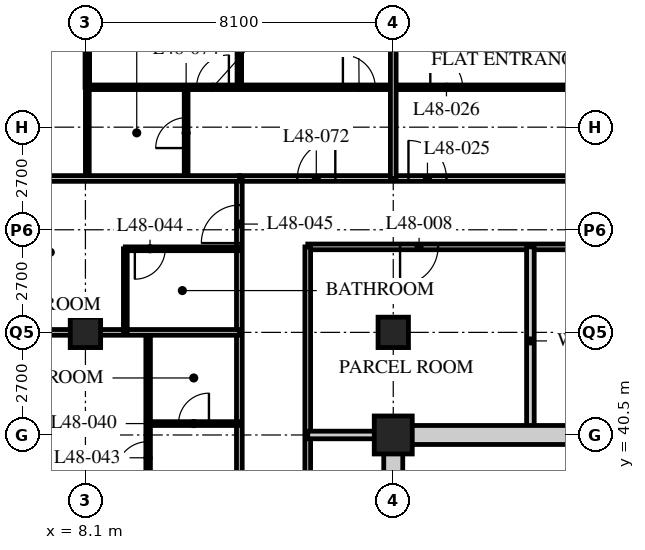
"""IFC4 building model, lengths in metres.
Left out: names, types, materials, properties, quantities, classifications, styles, units other than length and angle.
Written with IfcOpenShell. Run it as: python <this file> out.ifc"""

import sys

from ifc_helpers import new_model, si_unit, direction, frame, frame_2d, origin, origin_2d, place, context, subcontext, project, spatial, rectangle, hollow_rectangle, extrude, element, fill, save


model = new_model("IFC4")
c1 = context("Model", 3, precision=1e-05, world=origin(), true_north=direction((0.0, 1.0)))
c2 = subcontext(c1, "Body", "Model", "MODEL_VIEW")
j1 = project(units=[si_unit("LENGTHUNIT", "METRE"), si_unit("PLANEANGLEUNIT", "RADIAN")], contexts=[c1])
p1 = place(None, origin())
s1 = spatial("IfcSite", under=j1, at=p1, CompositionType="ELEMENT")
p2 = place(p1, origin())
s2 = spatial("IfcBuilding", under=s1, at=p2, CompositionType="ELEMENT")
p3 = place(p2, frame((0.0, 0.0, 188.4)))
s3 = spatial("IfcBuildingStorey", under=s2, at=p3, CompositionType="ELEMENT", Elevation=188.4)
p4 = place(p3, frame((8.1, 43.2, 0.0), z_axis=(0.0, 0.0, 1.0), x_axis=(1.0, 0.0, 0.0)))
e1 = element("IfcColumn", 1, at=p4, inside=s3, PredefinedType="COLUMN", context=c2, shape_type="SweptSolid", body=[
    extrude(hollow_rectangle(XDim=0.8, YDim=0.8, WallThickness=0.08, at=origin_2d()), origin(), (0.0, 0.0, 1.0), 3.6),
])
p5 = place(p3, frame((16.2, 40.5, 0.0), z_axis=(0.0, 0.0, 1.0), x_axis=(1.0, 0.0, 0.0)))
e2 = element("IfcColumn", 2, at=p5, inside=s3, PredefinedType="COLUMN", context=c2, shape_type="SweptSolid", body=[
    extrude(hollow_rectangle(XDim=1.0, YDim=1.0, WallThickness=0.1, at=origin_2d()), origin(), (0.0, 0.0, 1.0), 3.6),
])
p6 = place(p3, frame((16.2, 43.2, 0.0), z_axis=(0.0, 0.0, 1.0), x_axis=(1.0, 0.0, 0.0)))
e3 = element("IfcColumn", 3, at=p6, inside=s3, PredefinedType="COLUMN", context=c2, shape_type="SweptSolid", body=[
    extrude(hollow_rectangle(XDim=0.8, YDim=0.8, WallThickness=0.08, at=origin_2d()), origin(), (0.0, 0.0, 1.0), 3.6),
])
p7 = place(p3, frame((12.15, 47.25, 0.0), z_axis=(0.0, 0.0, 1.0), x_axis=(1.0, 0.0, 0.0)))
e4 = element("IfcWall", 4, at=p7, inside=s3, PredefinedType="PARTITIONING", context=c2, shape_type="SweptSolid", body=[
    extrude(rectangle(XDim=32.4, YDim=0.15, at=frame_2d((16.2, 0.0))), origin(), (0.0, 0.0, 1.0), 3.39),
])
p8 = place(p7, frame((4.45, 0.0, 0.0)))
e5 = element("IfcOpeningElement", 5, at=p8, cuts=e4, PredefinedType="OPENING", context=c2, shape_type="SweptSolid", body=[
    extrude(rectangle(XDim=1.0, YDim=2.1, at=frame_2d((0.5, 1.05))), frame((0.0, 0.085, 0.0), z_axis=(0.0, -1.0, 0.0), x_axis=(1.0, 0.0, 0.0)), (0.0, 0.0, 1.0), 0.17),
])
p9 = place(p7, frame((16.6, 0.0, 0.0)))
e6 = element("IfcOpeningElement", 6, at=p9, cuts=e4, PredefinedType="OPENING", context=c2, shape_type="SweptSolid", body=[
    extrude(rectangle(XDim=1.0, YDim=2.1, at=frame_2d((0.5, 1.05))), frame((0.0, 0.085, 0.0), z_axis=(0.0, -1.0, 0.0), x_axis=(1.0, 0.0, 0.0)), (0.0, 0.0, 1.0), 0.17),
])
p10 = place(p7, frame((29.875, 0.0, 0.0)))
e7 = element("IfcOpeningElement", 7, at=p10, cuts=e4, PredefinedType="OPENING", context=c2, shape_type="SweptSolid", body=[
    extrude(rectangle(XDim=1.0, YDim=2.1, at=frame_2d((0.5, 1.05))), frame((0.0, 0.085, 0.0), z_axis=(0.0, -1.0, 0.0), x_axis=(1.0, 0.0, 0.0)), (0.0, 0.0, 1.0), 0.17),
])
p11 = place(p7, frame((1.525, 0.0, 0.0)))
e8 = element("IfcOpeningElement", 8, at=p11, cuts=e4, PredefinedType="OPENING", context=c2, shape_type="SweptSolid", body=[
    extrude(rectangle(XDim=1.0, YDim=2.1, at=frame_2d((0.5, 1.05))), frame((0.0, 0.085, 0.0), z_axis=(0.0, -1.0, 0.0), x_axis=(1.0, 0.0, 0.0)), (0.0, 0.0, 1.0), 0.17),
])
p12 = place(p3, frame((12.15, 18.9, 0.0), z_axis=(0.0, 0.0, 1.0), x_axis=(0.0, 1.0, 0.0)))
e9 = element("IfcWall", 9, at=p12, inside=s3, PredefinedType="PARTITIONING", context=c2, shape_type="SweptSolid", body=[
    extrude(rectangle(XDim=28.35, YDim=0.15, at=frame_2d((14.175, 0.0))), origin(), (0.0, 0.0, 1.0), 3.39),
])
p13 = place(p12, frame((2.35, 0.0, 0.0)))
e10 = element("IfcOpeningElement", 10, at=p13, cuts=e9, PredefinedType="OPENING", context=c2, shape_type="SweptSolid", body=[
    extrude(rectangle(XDim=1.0, YDim=2.1, at=frame_2d((0.5, 1.05))), frame((0.0, 0.085, 0.0), z_axis=(0.0, -1.0, 0.0), x_axis=(1.0, 0.0, 0.0)), (0.0, 0.0, 1.0), 0.17),
])
p14 = place(p12, frame((6.4, 0.0, 0.0)))
e11 = element("IfcOpeningElement", 11, at=p14, cuts=e9, PredefinedType="OPENING", context=c2, shape_type="SweptSolid", body=[
    extrude(rectangle(XDim=1.0, YDim=2.1, at=frame_2d((0.5, 1.05))), frame((0.0, 0.085, 0.0), z_axis=(0.0, -1.0, 0.0), x_axis=(1.0, 0.0, 0.0)), (0.0, 0.0, 1.0), 0.17),
])
p15 = place(p12, frame((8.5, 0.0, 0.0)))
e12 = element("IfcOpeningElement", 12, at=p15, cuts=e9, PredefinedType="OPENING", context=c2, shape_type="SweptSolid", body=[
    extrude(rectangle(XDim=1.0, YDim=2.1, at=frame_2d((0.5, 1.05))), frame((0.0, 0.085, 0.0), z_axis=(0.0, -1.0, 0.0), x_axis=(1.0, 0.0, 0.0)), (0.0, 0.0, 1.0), 0.17),
])
p16 = place(p12, frame((16.6, 0.0, 0.0)))
e13 = element("IfcOpeningElement", 13, at=p16, cuts=e9, PredefinedType="OPENING", context=c2, shape_type="SweptSolid", body=[
    extrude(rectangle(XDim=1.0, YDim=2.1, at=frame_2d((0.5, 1.05))), frame((0.0, 0.085, 0.0), z_axis=(0.0, -1.0, 0.0), x_axis=(1.0, 0.0, 0.0)), (0.0, 0.0, 1.0), 0.17),
])
p17 = place(p12, frame((26.65, 0.0, 0.0)))
e14 = element("IfcOpeningElement", 14, at=p17, cuts=e9, PredefinedType="OPENING", context=c2, shape_type="SweptSolid", body=[
    extrude(rectangle(XDim=1.0, YDim=2.1, at=frame_2d((0.5, 1.05))), frame((0.0, 0.085, 0.0), z_axis=(0.0, -1.0, 0.0), x_axis=(1.0, 0.0, 0.0)), (0.0, 0.0, 1.0), 0.17),
])
p18 = place(p3, frame((27.14, 45.45, 0.0), z_axis=(0.0, 0.0, 1.0), x_axis=(-1.0, 0.0, 0.0)))
e15 = element("IfcWall", 15, at=p18, inside=s3, PredefinedType="PARTITIONING", context=c2, shape_type="SweptSolid", body=[
    extrude(rectangle(XDim=13.19, YDim=0.15, at=frame_2d((6.595, 0.0))), origin(), (0.0, 0.0, 1.0), 3.39),
])
p19 = place(p18, frame((9.761, 0.0, 0.0)))
e16 = element("IfcOpeningElement", 16, at=p19, cuts=e15, PredefinedType="OPENING", context=c2, shape_type="SweptSolid", body=[
    extrude(rectangle(XDim=1.0, YDim=2.1, at=frame_2d((0.5, 1.05))), frame((0.0, 0.085, 0.0), z_axis=(0.0, -1.0, 0.0), x_axis=(1.0, 0.0, 0.0)), (0.0, 0.0, 1.0), 0.17),
])
p20 = place(p18, frame((3.161, 0.0, 0.0)))
e17 = element("IfcOpeningElement", 17, at=p20, cuts=e15, PredefinedType="OPENING", context=c2, shape_type="SweptSolid", body=[
    extrude(rectangle(XDim=1.0, YDim=2.1, at=frame_2d((0.5, 1.05))), frame((0.0, 0.085, 0.0), z_axis=(0.0, -1.0, 0.0), x_axis=(1.0, 0.0, 0.0)), (0.0, 0.0, 1.0), 0.17),
])
p21 = place(p3, frame((13.95, 45.45, 0.0), z_axis=(0.0, 0.0, 1.0), x_axis=(0.0, -1.0, 0.0)))
e18 = element("IfcWall", 18, at=p21, inside=s3, PredefinedType="PARTITIONING", context=c2, shape_type="SweptSolid", body=[
    extrude(rectangle(XDim=24.75, YDim=0.15, at=frame_2d((12.375, 0.0))), origin(), (0.0, 0.0, 1.0), 3.39),
])
p22 = place(p21, frame((16.6, 0.0, 0.0)))
e19 = element("IfcOpeningElement", 19, at=p22, cuts=e18, PredefinedType="OPENING", context=c2, shape_type="SweptSolid", body=[
    extrude(rectangle(XDim=1.0, YDim=2.1, at=frame_2d((0.5, 1.05))), frame((0.0, 0.085, 0.0), z_axis=(0.0, -1.0, 0.0), x_axis=(1.0, 0.0, 0.0)), (0.0, 0.0, 1.0), 0.17),
])
p23 = place(p21, frame((8.5, 0.0, 0.0)))
e20 = element("IfcOpeningElement", 20, at=p23, cuts=e18, PredefinedType="OPENING", context=c2, shape_type="SweptSolid", body=[
    extrude(rectangle(XDim=1.0, YDim=2.1, at=frame_2d((0.5, 1.05))), frame((0.0, 0.085, 0.0), z_axis=(0.0, -1.0, 0.0), x_axis=(1.0, 0.0, 0.0)), (0.0, 0.0, 1.0), 0.17),
])
p24 = place(p3, frame((19.809, 45.45, 0.0), z_axis=(0.0, 0.0, 1.0), x_axis=(0.0, -1.0, 0.0)))
e21 = element("IfcWall", 21, at=p24, inside=s3, PredefinedType="SOLIDWALL", context=c2, shape_type="SweptSolid", body=[
    extrude(rectangle(XDim=4.95, YDim=0.2, at=frame_2d((2.475, 0.0))), origin(), (0.0, 0.0, 1.0), 3.39),
])
p25 = place(p3, frame((13.95, 40.5, 0.0), z_axis=(0.0, 0.0, 1.0), x_axis=(1.0, 0.0, 0.0)))
e22 = element("IfcWall", 22, at=p25, inside=s3, PredefinedType="SOLIDWALL", context=c2, shape_type="SweptSolid", body=[
    extrude(rectangle(XDim=2.25, YDim=0.2, at=frame_2d((1.125, 0.0))), origin(), (0.0, 0.0, 1.0), 3.39),
])
p26 = place(p3, frame((9.75, 27.0, 0.0), z_axis=(0.0, 0.0, 1.0), x_axis=(0.0, 1.0, 0.0)))
e23 = element("IfcWall", 23, at=p26, inside=s3, PredefinedType="PARTITIONING", context=c2, shape_type="SweptSolid", body=[
    extrude(rectangle(XDim=16.2, YDim=0.12, at=frame_2d((8.1, 0.0))), origin(), (0.0, 0.0, 1.0), 3.39),
])
p27 = place(p26, frame((0.975, 0.0, 0.0)))
e24 = element("IfcOpeningElement", 24, at=p27, cuts=e23, PredefinedType="OPENING", context=c2, shape_type="SweptSolid", body=[
    extrude(rectangle(XDim=0.85, YDim=2.1, at=frame_2d((0.425, 1.05))), frame((0.0, 0.07, 0.0), z_axis=(0.0, -1.0, 0.0), x_axis=(1.0, 0.0, 0.0)), (0.0, 0.0, 1.0), 0.14),
])
p28 = place(p26, frame((4.375, 0.0, 0.0)))
e25 = element("IfcOpeningElement", 25, at=p28, cuts=e23, PredefinedType="OPENING", context=c2, shape_type="SweptSolid", body=[
    extrude(rectangle(XDim=0.85, YDim=2.1, at=frame_2d((0.425, 1.05))), frame((0.0, 0.07, 0.0), z_axis=(0.0, -1.0, 0.0), x_axis=(1.0, 0.0, 0.0)), (0.0, 0.0, 1.0), 0.14),
])
p29 = place(p26, frame((9.075, 0.0, 0.0)))
e26 = element("IfcOpeningElement", 26, at=p29, cuts=e23, PredefinedType="OPENING", context=c2, shape_type="SweptSolid", body=[
    extrude(rectangle(XDim=0.85, YDim=2.1, at=frame_2d((0.425, 1.05))), frame((0.0, 0.07, 0.0), z_axis=(0.0, -1.0, 0.0), x_axis=(1.0, 0.0, 0.0)), (0.0, 0.0, 1.0), 0.14),
])
p30 = place(p26, frame((12.475, 0.0, 0.0)))
e27 = element("IfcOpeningElement", 27, at=p30, cuts=e23, PredefinedType="OPENING", context=c2, shape_type="SweptSolid", body=[
    extrude(rectangle(XDim=0.85, YDim=2.1, at=frame_2d((0.425, 1.05))), frame((0.0, 0.07, 0.0), z_axis=(0.0, -1.0, 0.0), x_axis=(1.0, 0.0, 0.0)), (0.0, 0.0, 1.0), 0.14),
])
p31 = place(p3, frame((12.15, 40.8, 0.0), z_axis=(0.0, 0.0, 1.0), x_axis=(-1.0, 0.0, 0.0)))
e28 = element("IfcWall", 28, at=p31, inside=s3, PredefinedType="PARTITIONING", context=c2, shape_type="SweptSolid", body=[
    extrude(rectangle(XDim=2.4, YDim=0.1, at=frame_2d((1.2, 0.0))), origin(), (0.0, 0.0, 1.0), 3.39),
])
p32 = place(p31, frame((0.8, 0.0, 0.0)))
e29 = element("IfcOpeningElement", 29, at=p32, cuts=e28, PredefinedType="OPENING", context=c2, shape_type="SweptSolid", body=[
    extrude(rectangle(XDim=0.8, YDim=2.1, at=frame_2d((0.4, 1.05))), frame((0.0, 0.06, 0.0), z_axis=(0.0, -1.0, 0.0), x_axis=(1.0, 0.0, 0.0)), (0.0, 0.0, 1.0), 0.12),
])
p33 = place(p3, frame((12.15, 43.2, 0.0), z_axis=(0.0, 0.0, 1.0), x_axis=(-1.0, 0.0, 0.0)))
e30 = element("IfcWall", 30, at=p33, inside=s3, PredefinedType="PARTITIONING", context=c2, shape_type="SweptSolid", body=[
    extrude(rectangle(XDim=11.85, YDim=0.15, at=frame_2d((5.925, 0.0))), origin(), (0.0, 0.0, 1.0), 2.778),
])
p34 = place(p3, frame((9.15, 43.2, 0.0), z_axis=(0.0, 0.0, 1.0), x_axis=(0.0, 1.0, 0.0)))
e31 = element("IfcWall", 31, at=p34, inside=s3, PredefinedType="PARTITIONING", context=c2, shape_type="SweptSolid", body=[
    extrude(rectangle(XDim=2.2, YDim=0.1, at=frame_2d((1.1, 0.0))), origin(), (0.0, 0.0, 1.0), 3.39),
])
p35 = place(p3, frame((12.15, 45.4, 0.0), z_axis=(0.0, 0.0, 1.0), x_axis=(-1.0, 0.0, 0.0)))
e32 = element("IfcWall", 32, at=p35, inside=s3, PredefinedType="PARTITIONING", context=c2, shape_type="SweptSolid", body=[
    extrude(rectangle(XDim=3.0, YDim=0.1, at=frame_2d((1.5, 0.0))), origin(), (0.0, 0.0, 1.0), 3.39),
])
p36 = place(p35, frame((1.95, 0.0, 0.0)))
e33 = element("IfcOpeningElement", 33, at=p36, cuts=e32, PredefinedType="OPENING", context=c2, shape_type="SweptSolid", body=[
    extrude(rectangle(XDim=0.8, YDim=2.1, at=frame_2d((0.4, 1.05))), frame((0.0, 0.06, 0.0), z_axis=(0.0, -1.0, 0.0), x_axis=(1.0, 0.0, 0.0)), (0.0, 0.0, 1.0), 0.12),
])
p37 = place(p3, frame((10.75, 47.25, 0.0), z_axis=(0.0, 0.0, 1.0), x_axis=(0.0, 1.0, 0.0)))
e34 = element("IfcWall", 34, at=p37, inside=s3, PredefinedType="PARTITIONING", context=c2, shape_type="SweptSolid", body=[
    extrude(rectangle(XDim=2.4, YDim=0.1, at=frame_2d((1.2, 0.0))), origin(), (0.0, 0.0, 1.0), 3.39),
])
p38 = place(p37, frame((0.8, 0.0, 0.0)))
e35 = element("IfcOpeningElement", 35, at=p38, cuts=e34, PredefinedType="OPENING", context=c2, shape_type="SweptSolid", body=[
    extrude(rectangle(XDim=0.8, YDim=2.1, at=frame_2d((0.4, 1.05))), frame((0.0, 0.06, 0.0), z_axis=(0.0, -1.0, 0.0), x_axis=(1.0, 0.0, 0.0)), (0.0, 0.0, 1.0), 0.12),
])
p39 = place(p3, frame((8.15, 47.25, 0.0), z_axis=(0.0, 0.0, 1.0), x_axis=(0.0, 1.0, 0.0)))
e36 = element("IfcWall", 36, at=p39, inside=s3, PredefinedType="PARTITIONING", context=c2, shape_type="SweptSolid", body=[
    extrude(rectangle(XDim=2.4, YDim=0.1, at=frame_2d((1.2, 0.0))), origin(), (0.0, 0.0, 1.0), 2.778),
])
p40 = place(p3, frame((8.15, 49.65, 0.0), z_axis=(0.0, 0.0, 1.0), x_axis=(1.0, 0.0, 0.0)))
e37 = element("IfcWall", 37, at=p40, inside=s3, PredefinedType="PARTITIONING", context=c2, shape_type="SweptSolid", body=[
    extrude(rectangle(XDim=40.4, YDim=0.12, at=frame_2d((20.2, 0.0))), origin(), (0.0, 0.0, 1.0), 3.39),
])
p41 = place(p40, frame((9.025, 0.0, 0.0)))
e38 = element("IfcOpeningElement", 38, at=p41, cuts=e37, PredefinedType="OPENING", context=c2, shape_type="SweptSolid", body=[
    extrude(rectangle(XDim=0.85, YDim=2.1, at=frame_2d((0.425, 1.05))), frame((0.0, 0.07, 0.0), z_axis=(0.0, -1.0, 0.0), x_axis=(1.0, 0.0, 0.0)), (0.0, 0.0, 1.0), 0.14),
])
p42 = place(p40, frame((16.475, 0.0, 0.0)))
e39 = element("IfcOpeningElement", 39, at=p42, cuts=e37, PredefinedType="OPENING", context=c2, shape_type="SweptSolid", body=[
    extrude(rectangle(XDim=0.85, YDim=2.1, at=frame_2d((0.425, 1.05))), frame((0.0, 0.07, 0.0), z_axis=(0.0, -1.0, 0.0), x_axis=(1.0, 0.0, 0.0)), (0.0, 0.0, 1.0), 0.14),
])
p43 = place(p40, frame((21.175, 0.0, 0.0)))
e40 = element("IfcOpeningElement", 40, at=p43, cuts=e37, PredefinedType="OPENING", context=c2, shape_type="SweptSolid", body=[
    extrude(rectangle(XDim=0.85, YDim=2.1, at=frame_2d((0.425, 1.05))), frame((0.0, 0.07, 0.0), z_axis=(0.0, -1.0, 0.0), x_axis=(1.0, 0.0, 0.0)), (0.0, 0.0, 1.0), 0.14),
])
p44 = place(p40, frame((28.625, 0.0, 0.0)))
e41 = element("IfcOpeningElement", 41, at=p44, cuts=e37, PredefinedType="OPENING", context=c2, shape_type="SweptSolid", body=[
    extrude(rectangle(XDim=0.85, YDim=2.1, at=frame_2d((0.425, 1.05))), frame((0.0, 0.07, 0.0), z_axis=(0.0, -1.0, 0.0), x_axis=(1.0, 0.0, 0.0)), (0.0, 0.0, 1.0), 0.14),
])
p45 = place(p40, frame((32.825, 0.0, 0.0)))
e42 = element("IfcOpeningElement", 42, at=p45, cuts=e37, PredefinedType="OPENING", context=c2, shape_type="SweptSolid", body=[
    extrude(rectangle(XDim=0.85, YDim=2.1, at=frame_2d((0.425, 1.05))), frame((0.0, 0.07, 0.0), z_axis=(0.0, -1.0, 0.0), x_axis=(1.0, 0.0, 0.0)), (0.0, 0.0, 1.0), 0.14),
])
p46 = place(p40, frame((36.675, 0.0, 0.0)))
e43 = element("IfcOpeningElement", 43, at=p46, cuts=e37, PredefinedType="OPENING", context=c2, shape_type="SweptSolid", body=[
    extrude(rectangle(XDim=0.85, YDim=2.1, at=frame_2d((0.425, 1.05))), frame((0.0, 0.07, 0.0), z_axis=(0.0, -1.0, 0.0), x_axis=(1.0, 0.0, 0.0)), (0.0, 0.0, 1.0), 0.14),
])
p47 = place(p40, frame((6.725, 0.0, 0.0)))
e44 = element("IfcOpeningElement", 44, at=p47, cuts=e37, PredefinedType="OPENING", context=c2, shape_type="SweptSolid", body=[
    extrude(rectangle(XDim=0.85, YDim=2.1, at=frame_2d((0.425, 1.05))), frame((0.0, 0.07, 0.0), z_axis=(0.0, -1.0, 0.0), x_axis=(1.0, 0.0, 0.0)), (0.0, 0.0, 1.0), 0.14),
])
p48 = place(p40, frame((2.875, 0.0, 0.0)))
e45 = element("IfcOpeningElement", 45, at=p48, cuts=e37, PredefinedType="OPENING", context=c2, shape_type="SweptSolid", body=[
    extrude(rectangle(XDim=0.85, YDim=2.1, at=frame_2d((0.425, 1.05))), frame((0.0, 0.07, 0.0), z_axis=(0.0, -1.0, 0.0), x_axis=(1.0, 0.0, 0.0)), (0.0, 0.0, 1.0), 0.14),
])
p49 = place(p3, frame((12.15, 49.65, 0.0), z_axis=(0.0, 0.0, 1.0), x_axis=(0.0, 1.0, 0.0)))
e46 = element("IfcWall", 46, at=p49, inside=s3, PredefinedType="PARTITIONING", context=c2, shape_type="SweptSolid", body=[
    extrude(rectangle(XDim=9.45, YDim=0.12, at=frame_2d((4.725, 0.0))), origin(), (0.0, 0.0, 1.0), 3.39),
])
p50 = place(p3, frame((0.3, 47.25, 0.0), z_axis=(0.0, 0.0, 1.0), x_axis=(1.0, 0.0, 0.0)))
e47 = element("IfcWall", 47, at=p50, inside=s3, PredefinedType="PARTITIONING", context=c2, shape_type="SweptSolid", body=[
    extrude(rectangle(XDim=11.85, YDim=0.15, at=frame_2d((5.925, 0.0))), origin(), (0.0, 0.0, 1.0), 3.39),
])
p51 = place(p3, frame((16.2, 47.25, 0.0), z_axis=(0.0, 0.0, 1.0), x_axis=(0.0, 1.0, 0.0)))
e48 = element("IfcWall", 48, at=p51, inside=s3, PredefinedType="PARTITIONING", context=c2, shape_type="SweptSolid", body=[
    extrude(rectangle(XDim=11.85, YDim=0.15, at=frame_2d((5.925, 0.0))), origin(), (0.0, 0.0, 1.0), 2.778),
])
p52 = place(p3, frame((8.15, 49.65, 0.0), z_axis=(0.0, 0.0, 1.0), x_axis=(0.0, 1.0, 0.0)))
e49 = element("IfcWall", 49, at=p52, inside=s3, PredefinedType="PARTITIONING", context=c2, shape_type="SweptSolid", body=[
    extrude(rectangle(XDim=1.25, YDim=0.12, at=frame_2d((0.625, 0.0))), origin(), (0.0, 0.0, 1.0), 2.778),
])
p53 = place(p3, frame((15.95, 40.5, 0.0), z_axis=(0.0, 0.0, 1.0), x_axis=(1.0, 0.0, 0.0)))
e50 = element("IfcWall", 50, at=p53, inside=s3, PredefinedType="SOLIDWALL", context=c2, shape_type="SweptSolid", body=[
    extrude(rectangle(XDim=24.8, YDim=0.5, at=frame_2d((12.4, 0.0))), origin(), (0.0, 0.0, 1.0), 2.74),
])
p54 = place(p53, frame((11.5, 0.0, 0.0)))
e51 = element("IfcOpeningElement", 51, at=p54, cuts=e50, PredefinedType="OPENING", context=c2, shape_type="SweptSolid", body=[
    extrude(rectangle(XDim=1.8, YDim=2.4, at=frame_2d((0.9, 1.2))), frame((0.0, 0.26, 0.0), z_axis=(0.0, -1.0, 0.0), x_axis=(1.0, 0.0, 0.0)), (0.0, 0.0, 1.0), 0.52),
])
p55 = place(p3, frame((16.2, 24.55, 0.0), z_axis=(0.0, 0.0, 1.0), x_axis=(0.0, 1.0, 0.0)))
e52 = element("IfcWall", 52, at=p55, inside=s3, PredefinedType="SOLIDWALL", context=c2, shape_type="SweptSolid", body=[
    extrude(rectangle(XDim=15.7, YDim=0.5, at=frame_2d((7.85, 0.0))), origin(), (0.0, 0.0, 1.0), 2.778),
])
p56 = place(p19, origin())
e53 = element("IfcDoor", 53, at=p56, inside=s3, OperationType="SINGLE_SWING_RIGHT", PredefinedType="DOOR", context=c2, shape_type="SweptSolid", body=[
    extrude(rectangle(XDim=1.0, YDim=2.1, at=frame_2d((0.5, 1.05))), frame((0.0, 0.025, 0.0), z_axis=(0.0, -1.0, 0.0), x_axis=(1.0, 0.0, 0.0)), (0.0, 0.0, 1.0), 0.05),
])
fill(e16, e53)
p57 = place(p8, origin())
e54 = element("IfcDoor", 54, at=p57, inside=s3, OperationType="SINGLE_SWING_LEFT", PredefinedType="DOOR", context=c2, shape_type="SweptSolid", body=[
    extrude(rectangle(XDim=1.0, YDim=2.1, at=frame_2d((0.5, 1.05))), frame((0.0, 0.025, 0.0), z_axis=(0.0, -1.0, 0.0), x_axis=(1.0, 0.0, 0.0)), (0.0, 0.0, 1.0), 0.05),
])
fill(e5, e54)
p58 = place(p41, origin())
e55 = element("IfcDoor", 55, at=p58, inside=s3, OperationType="SINGLE_SWING_LEFT", PredefinedType="DOOR", context=c2, shape_type="SweptSolid", body=[
    extrude(rectangle(XDim=0.85, YDim=2.1, at=frame_2d((0.425, 1.05))), frame((0.0, 0.025, 0.0), z_axis=(0.0, -1.0, 0.0), x_axis=(1.0, 0.0, 0.0)), (0.0, 0.0, 1.0), 0.05),
])
fill(e38, e55)
p59 = place(p32, origin())
e56 = element("IfcDoor", 56, at=p59, inside=s3, OperationType="SINGLE_SWING_RIGHT", PredefinedType="DOOR", context=c2, shape_type="SweptSolid", body=[
    extrude(rectangle(XDim=0.8, YDim=2.1, at=frame_2d((0.4, 1.05))), frame((0.0, 0.025, 0.0), z_axis=(0.0, -1.0, 0.0), x_axis=(1.0, 0.0, 0.0)), (0.0, 0.0, 1.0), 0.05),
])
fill(e29, e56)
p60 = place(p30, origin())
e57 = element("IfcDoor", 57, at=p60, inside=s3, OperationType="SINGLE_SWING_LEFT", PredefinedType="DOOR", context=c2, shape_type="SweptSolid", body=[
    extrude(rectangle(XDim=0.85, YDim=2.1, at=frame_2d((0.425, 1.05))), frame((0.0, 0.025, 0.0), z_axis=(0.0, -1.0, 0.0), x_axis=(1.0, 0.0, 0.0)), (0.0, 0.0, 1.0), 0.05),
])
fill(e27, e57)
p61 = place(p36, origin())
e58 = element("IfcDoor", 58, at=p61, inside=s3, OperationType="SINGLE_SWING_RIGHT", PredefinedType="DOOR", context=c2, shape_type="SweptSolid", body=[
    extrude(rectangle(XDim=0.8, YDim=2.1, at=frame_2d((0.4, 1.05))), frame((0.0, 0.025, 0.0), z_axis=(0.0, -1.0, 0.0), x_axis=(1.0, 0.0, 0.0)), (0.0, 0.0, 1.0), 0.05),
])
fill(e33, e58)
p62 = place(p17, origin())
e59 = element("IfcDoor", 59, at=p62, inside=s3, OperationType="SINGLE_SWING_LEFT", PredefinedType="DOOR", context=c2, shape_type="SweptSolid", body=[
    extrude(rectangle(XDim=1.0, YDim=2.1, at=frame_2d((0.5, 1.05))), frame((0.0, 0.025, 0.0), z_axis=(0.0, -1.0, 0.0), x_axis=(1.0, 0.0, 0.0)), (0.0, 0.0, 1.0), 0.05),
])
fill(e14, e59)
p63 = place(p11, origin())
e60 = element("IfcDoor", 60, at=p63, inside=s3, OperationType="SINGLE_SWING_RIGHT", PredefinedType="DOOR", context=c2, shape_type="SweptSolid", body=[
    extrude(rectangle(XDim=1.0, YDim=2.1, at=frame_2d((0.5, 1.05))), frame((0.0, 0.025, 0.0), z_axis=(0.0, -1.0, 0.0), x_axis=(1.0, 0.0, 0.0)), (0.0, 0.0, 1.0), 0.05),
])
fill(e8, e60)
p64 = place(p47, origin())
e61 = element("IfcDoor", 61, at=p64, inside=s3, OperationType="SINGLE_SWING_LEFT", PredefinedType="DOOR", context=c2, shape_type="SweptSolid", body=[
    extrude(rectangle(XDim=0.85, YDim=2.1, at=frame_2d((0.425, 1.05))), frame((0.0, 0.025, 0.0), z_axis=(0.0, -1.0, 0.0), x_axis=(1.0, 0.0, 0.0)), (0.0, 0.0, 1.0), 0.05),
])
fill(e44, e61)
p65 = place(p38, origin())
e62 = element("IfcDoor", 62, at=p65, inside=s3, OperationType="SINGLE_SWING_LEFT", PredefinedType="DOOR", context=c2, shape_type="SweptSolid", body=[
    extrude(rectangle(XDim=0.8, YDim=2.1, at=frame_2d((0.4, 1.05))), frame((0.0, 0.025, 0.0), z_axis=(0.0, -1.0, 0.0), x_axis=(1.0, 0.0, 0.0)), (0.0, 0.0, 1.0), 0.05),
])
fill(e35, e62)
p66 = place(p48, origin())
e63 = element("IfcDoor", 63, at=p66, inside=s3, OperationType="SINGLE_SWING_RIGHT", PredefinedType="DOOR", context=c2, shape_type="SweptSolid", body=[
    extrude(rectangle(XDim=0.85, YDim=2.1, at=frame_2d((0.425, 1.05))), frame((0.0, 0.025, 0.0), z_axis=(0.0, -1.0, 0.0), x_axis=(1.0, 0.0, 0.0)), (0.0, 0.0, 1.0), 0.05),
])
fill(e45, e63)
save(model, sys.argv[1])
